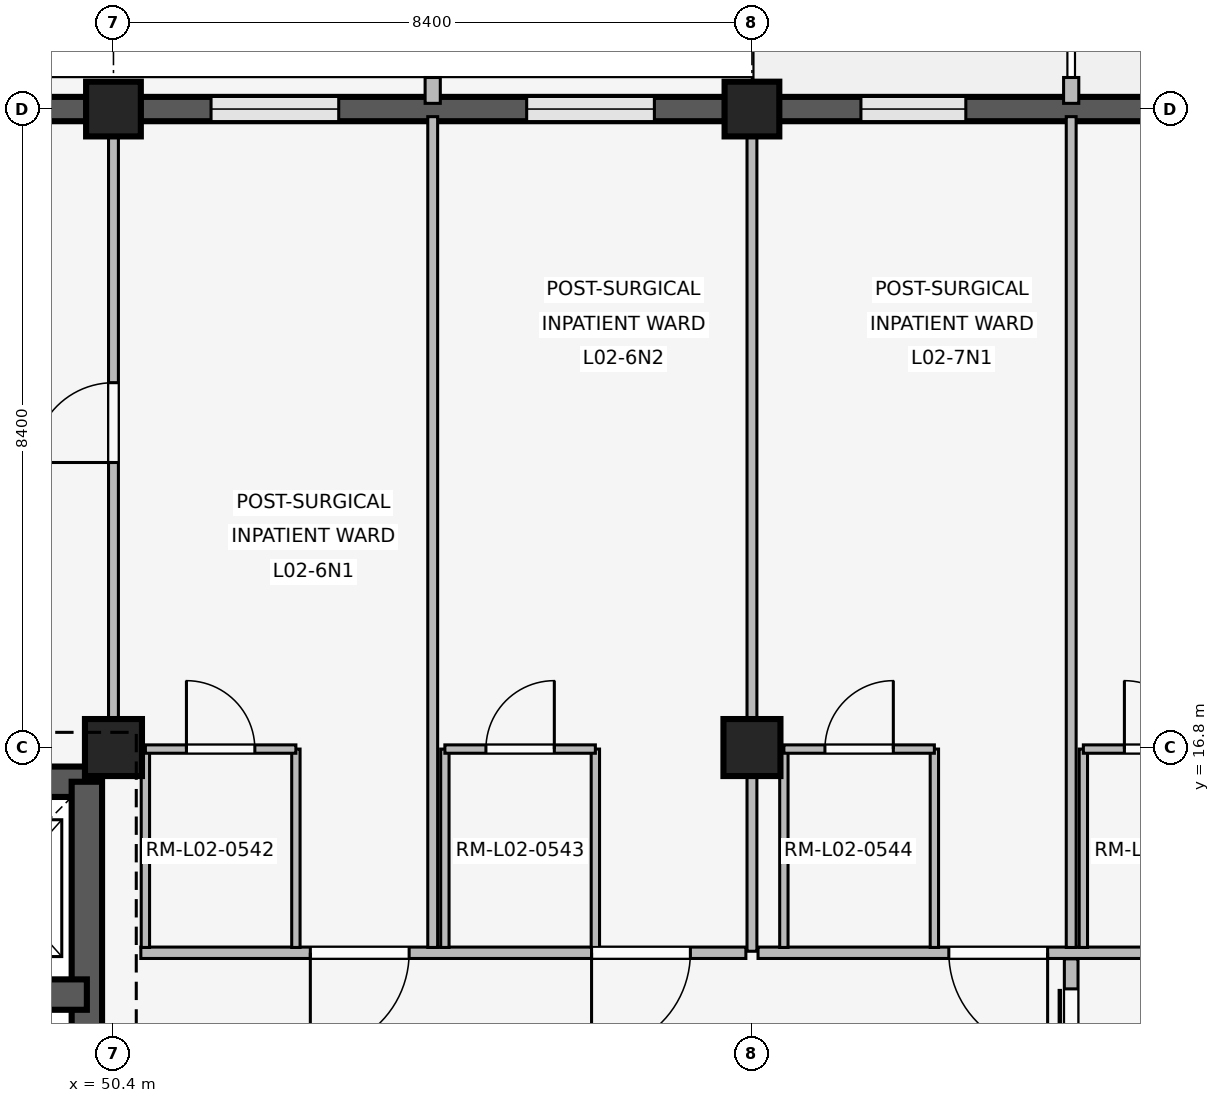
"""IFC4 building model, lengths in metres.
Left out: names, types, materials, properties, quantities, classifications, styles, units other than length and angle.
Written with IfcOpenShell. Run it as: python <this file> out.ifc"""

import sys

from ifc_helpers import new_model, si_unit, direction, frame, frame_2d, origin, origin_2d, place, context, subcontext, project, spatial, rectangle, extrude, element, fill, save


model = new_model("IFC4")
c1 = context("Model", 3, precision=1e-05, world=origin(), true_north=direction((0.0, 1.0)))
c2 = subcontext(c1, "Body", "Model", "MODEL_VIEW")
j1 = project(units=[si_unit("LENGTHUNIT", "METRE"), si_unit("PLANEANGLEUNIT", "RADIAN")], contexts=[c1])
p1 = place(None, origin())
s1 = spatial("IfcSite", under=j1, at=p1, CompositionType="ELEMENT")
p2 = place(p1, origin())
s2 = spatial("IfcBuilding", under=s1, at=p2, CompositionType="ELEMENT")
p3 = place(p2, frame((0.0, 0.0, 8.1)))
s3 = spatial("IfcBuildingStorey", under=s2, at=p3, CompositionType="ELEMENT", Elevation=8.1)
p4 = place(p3, frame((50.4, 16.8, 0.0), z_axis=(0.0, 0.0, 1.0), x_axis=(1.0, 0.0, 0.0)))
e1 = element("IfcColumn", 1, at=p4, inside=s3, PredefinedType="COLUMN", context=c2, shape_type="SweptSolid", body=[
    extrude(rectangle(XDim=0.75, YDim=0.75, at=origin_2d()), origin(), (0.0, 0.0, 1.0), 4.8),
])
p5 = place(p3, frame((50.4, 25.2, 0.0), z_axis=(0.0, 0.0, 1.0), x_axis=(1.0, 0.0, 0.0)))
e2 = element("IfcColumn", 2, at=p5, inside=s3, PredefinedType="COLUMN", context=c2, shape_type="SweptSolid", body=[
    extrude(rectangle(XDim=0.72, YDim=0.72, at=origin_2d()), origin(), (0.0, 0.0, 1.0), 4.8),
])
p6 = place(p3, frame((58.8, 16.8, 0.0), z_axis=(0.0, 0.0, 1.0), x_axis=(1.0, 0.0, 0.0)))
e3 = element("IfcColumn", 3, at=p6, inside=s3, PredefinedType="COLUMN", context=c2, shape_type="SweptSolid", body=[
    extrude(rectangle(XDim=0.75, YDim=0.75, at=origin_2d()), origin(), (0.0, 0.0, 1.0), 4.8),
])
p7 = place(p3, frame((58.8, 25.2, 0.0), z_axis=(0.0, 0.0, 1.0), x_axis=(1.0, 0.0, 0.0)))
e4 = element("IfcColumn", 4, at=p7, inside=s3, PredefinedType="COLUMN", context=c2, shape_type="SweptSolid", body=[
    extrude(rectangle(XDim=0.72, YDim=0.72, at=origin_2d()), origin(), (0.0, 0.0, 1.0), 4.8),
])
p8 = place(p3, frame((42.355, 25.2, 0.0), z_axis=(0.0, 0.0, 1.0), x_axis=(1.0, 0.0, 0.0)))
e5 = element("IfcWall", 5, at=p8, inside=s3, PredefinedType="SOLIDWALL", context=c2, shape_type="SweptSolid", body=[
    extrude(rectangle(XDim=7.69, YDim=0.32, at=frame_2d((3.845, 0.0))), origin(), (0.0, 0.0, 1.0), 3.86),
])
p9 = place(p8, frame((0.999, 0.0, 0.85)))
e6 = element("IfcOpeningElement", 6, at=p9, cuts=e5, PredefinedType="OPENING", context=c2, shape_type="SweptSolid", body=[
    extrude(rectangle(XDim=1.54, YDim=1.85, at=frame_2d((0.77, 0.925))), frame((0.0, 0.17, 0.0), z_axis=(0.0, -1.0, 0.0), x_axis=(1.0, 0.0, 0.0)), (0.0, 0.0, 1.0), 0.34),
])
p10 = place(p8, frame((5.151, 0.0, 0.85)))
e7 = element("IfcOpeningElement", 7, at=p10, cuts=e5, PredefinedType="OPENING", context=c2, shape_type="SweptSolid", body=[
    extrude(rectangle(XDim=1.54, YDim=1.85, at=frame_2d((0.77, 0.925))), frame((0.0, 0.17, 0.0), z_axis=(0.0, -1.0, 0.0), x_axis=(1.0, 0.0, 0.0)), (0.0, 0.0, 1.0), 0.34),
])
p11 = place(p3, frame((50.755, 25.2, 0.0), z_axis=(0.0, 0.0, 1.0), x_axis=(1.0, 0.0, 0.0)))
e8 = element("IfcWall", 8, at=p11, inside=s3, PredefinedType="SOLIDWALL", context=c2, shape_type="SweptSolid", body=[
    extrude(rectangle(XDim=7.69, YDim=0.32, at=frame_2d((3.845, 0.0))), origin(), (0.0, 0.0, 1.0), 3.86),
])
p12 = place(p11, frame((0.929, 0.0, 0.85)))
e9 = element("IfcOpeningElement", 9, at=p12, cuts=e8, PredefinedType="OPENING", context=c2, shape_type="SweptSolid", body=[
    extrude(rectangle(XDim=1.68, YDim=2.05, at=frame_2d((0.84, 1.025))), frame((0.0, 0.17, 0.0), z_axis=(0.0, -1.0, 0.0), x_axis=(1.0, 0.0, 0.0)), (0.0, 0.0, 1.0), 0.34),
])
p13 = place(p11, frame((5.081, 0.0, 0.85)))
e10 = element("IfcOpeningElement", 10, at=p13, cuts=e8, PredefinedType="OPENING", context=c2, shape_type="SweptSolid", body=[
    extrude(rectangle(XDim=1.68, YDim=2.05, at=frame_2d((0.84, 1.025))), frame((0.0, 0.17, 0.0), z_axis=(0.0, -1.0, 0.0), x_axis=(1.0, 0.0, 0.0)), (0.0, 0.0, 1.0), 0.34),
])
p14 = place(p3, frame((54.6, 25.275, 0.0), z_axis=(0.0, 0.0, 1.0), x_axis=(0.0, 1.0, 0.0)))
e11 = element("IfcWall", 11, at=p14, inside=s3, PredefinedType="ELEMENTEDWALL", context=c2, shape_type="SweptSolid", body=[
    extrude(rectangle(XDim=0.34, YDim=0.2, at=frame_2d((0.17, 0.0))), origin(), (0.0, 0.0, 1.0), 3.84),
])
p15 = place(p3, frame((59.155, 25.2, 0.0), z_axis=(0.0, 0.0, 1.0), x_axis=(1.0, 0.0, 0.0)))
e12 = element("IfcWall", 12, at=p15, inside=s3, PredefinedType="SOLIDWALL", context=c2, shape_type="SweptSolid", body=[
    extrude(rectangle(XDim=7.69, YDim=0.32, at=frame_2d((3.845, 0.0))), origin(), (0.0, 0.0, 1.0), 3.86),
])
p16 = place(p15, frame((1.079, 0.0, 0.85)))
e13 = element("IfcOpeningElement", 13, at=p16, cuts=e12, PredefinedType="OPENING", context=c2, shape_type="SweptSolid", body=[
    extrude(rectangle(XDim=1.38, YDim=1.5, at=frame_2d((0.69, 0.75))), frame((0.0, 0.17, 0.0), z_axis=(0.0, -1.0, 0.0), x_axis=(1.0, 0.0, 0.0)), (0.0, 0.0, 1.0), 0.34),
])
p17 = place(p15, frame((5.231, 0.0, 0.85)))
e14 = element("IfcOpeningElement", 14, at=p17, cuts=e12, PredefinedType="OPENING", context=c2, shape_type="SweptSolid", body=[
    extrude(rectangle(XDim=1.38, YDim=1.5, at=frame_2d((0.69, 0.75))), frame((0.0, 0.17, 0.0), z_axis=(0.0, -1.0, 0.0), x_axis=(1.0, 0.0, 0.0)), (0.0, 0.0, 1.0), 0.34),
])
p18 = place(p3, frame((63.0, 25.275, 0.0), z_axis=(0.0, 0.0, 1.0), x_axis=(0.0, 1.0, 0.0)))
e15 = element("IfcWall", 15, at=p18, inside=s3, PredefinedType="ELEMENTEDWALL", context=c2, shape_type="SweptSolid", body=[
    extrude(rectangle(XDim=0.34, YDim=0.2, at=frame_2d((0.17, 0.0))), origin(), (0.0, 0.0, 1.0), 3.84),
])
p19 = place(p3, frame((42.55, 16.35, 0.0), z_axis=(0.0, 0.0, 1.0), x_axis=(1.0, 0.0, 0.0)))
e16 = element("IfcWall", 16, at=p19, inside=s3, PredefinedType="SHEAR", context=c2, shape_type="SweptSolid", body=[
    extrude(rectangle(XDim=7.5, YDim=0.4, at=frame_2d((3.75, 0.0))), origin(), (0.0, 0.0, 1.0), 4.52),
])
p20 = place(p3, frame((50.05, 8.8, 0.0), z_axis=(0.0, 0.0, 1.0), x_axis=(0.0, 1.0, 0.0)))
e17 = element("IfcWall", 17, at=p20, inside=s3, PredefinedType="SHEAR", context=c2, shape_type="SweptSolid", body=[
    extrude(rectangle(XDim=7.55, YDim=0.4, at=frame_2d((3.775, 0.0))), origin(), (0.0, 0.0, 1.0), 4.52),
])
p21 = place(p20, frame((2.4, 0.0, 0.0)))
e18 = element("IfcOpeningElement", 18, at=p21, cuts=e17, PredefinedType="OPENING", context=c2, shape_type="SweptSolid", body=[
    extrude(rectangle(XDim=1.2, YDim=2.2, at=frame_2d((0.6, 1.1))), frame((0.0, 0.21, 0.0), z_axis=(0.0, -1.0, 0.0), x_axis=(1.0, 0.0, 0.0)), (0.0, 0.0, 1.0), 0.42),
])
p22 = place(p3, frame((46.25, 13.55, 0.0), z_axis=(0.0, 0.0, 1.0), x_axis=(1.0, 0.0, 0.0)))
e19 = element("IfcWall", 19, at=p22, inside=s3, PredefinedType="SHEAR", context=c2, shape_type="SweptSolid", body=[
    extrude(rectangle(XDim=3.8, YDim=0.4, at=frame_2d((1.9, 0.0))), origin(), (0.0, 0.0, 1.0), 4.52),
])
p23 = place(p22, frame((0.32, 0.0, 0.0)))
e20 = element("IfcOpeningElement", 20, at=p23, cuts=e19, PredefinedType="OPENING", context=c2, shape_type="SweptSolid", body=[
    extrude(rectangle(XDim=1.4, YDim=2.25, at=frame_2d((0.7, 1.125))), frame((0.0, 0.21, 0.0), z_axis=(0.0, -1.0, 0.0), x_axis=(1.0, 0.0, 0.0)), (0.0, 0.0, 1.0), 0.42),
])
p24 = place(p22, frame((2.04, 0.0, 0.0)))
e21 = element("IfcOpeningElement", 21, at=p24, cuts=e19, PredefinedType="OPENING", context=c2, shape_type="SweptSolid", body=[
    extrude(rectangle(XDim=1.1, YDim=2.15, at=frame_2d((0.55, 1.075))), frame((0.0, 0.21, 0.0), z_axis=(0.0, -1.0, 0.0), x_axis=(1.0, 0.0, 0.0)), (0.0, 0.0, 1.0), 0.42),
])
p25 = place(p3, frame((50.4, 17.15, 0.0), z_axis=(0.0, 0.0, 1.0), x_axis=(0.0, 1.0, 0.0)))
e22 = element("IfcWall", 22, at=p25, inside=s3, PredefinedType="PARTITIONING", context=c2, shape_type="SweptSolid", body=[
    extrude(rectangle(XDim=7.91, YDim=0.13, at=frame_2d((3.955, 0.0))), origin(), (0.0, 0.0, 1.0), 3.84),
])
p26 = place(p25, frame((3.4, 0.0, 0.0)))
e23 = element("IfcOpeningElement", 23, at=p26, cuts=e22, PredefinedType="OPENING", context=c2, shape_type="SweptSolid", body=[
    extrude(rectangle(XDim=1.05, YDim=2.2, at=frame_2d((0.525, 1.1))), frame((0.0, 0.075, 0.0), z_axis=(0.0, -1.0, 0.0), x_axis=(1.0, 0.0, 0.0)), (0.0, 0.0, 1.0), 0.15),
])
p27 = place(p3, frame((58.72, 14.1, 0.0), z_axis=(0.0, 0.0, 1.0), x_axis=(-1.0, 0.0, 0.0)))
e24 = element("IfcWall", 24, at=p27, inside=s3, PredefinedType="PARTITIONING", context=c2, shape_type="SweptSolid", body=[
    extrude(rectangle(XDim=7.96, YDim=0.15, at=frame_2d((3.98, 0.0))), origin(), (0.0, 0.0, 1.0), 3.84),
])
p28 = place(p27, frame((0.73, 0.0, 0.0)))
e25 = element("IfcOpeningElement", 25, at=p28, cuts=e24, PredefinedType="OPENING", context=c2, shape_type="SweptSolid", body=[
    extrude(rectangle(XDim=1.3, YDim=2.25, at=frame_2d((0.65, 1.125))), frame((0.0, 0.085, 0.0), z_axis=(0.0, -1.0, 0.0), x_axis=(1.0, 0.0, 0.0)), (0.0, 0.0, 1.0), 0.17),
])
p29 = place(p27, frame((4.43, 0.0, 0.0)))
e26 = element("IfcOpeningElement", 26, at=p29, cuts=e24, PredefinedType="OPENING", context=c2, shape_type="SweptSolid", body=[
    extrude(rectangle(XDim=1.3, YDim=2.25, at=frame_2d((0.65, 1.125))), frame((0.0, 0.085, 0.0), z_axis=(0.0, -1.0, 0.0), x_axis=(1.0, 0.0, 0.0)), (0.0, 0.0, 1.0), 0.17),
])
p30 = place(p3, frame((54.6, 14.17, 0.0), z_axis=(0.0, 0.0, 1.0), x_axis=(0.0, 1.0, 0.0)))
e27 = element("IfcWall", 27, at=p30, inside=s3, PredefinedType="PARTITIONING", context=c2, shape_type="SweptSolid", body=[
    extrude(rectangle(XDim=10.93, YDim=0.13, at=frame_2d((5.465, 0.0))), origin(), (0.0, 0.0, 1.0), 3.84),
])
for number, where, z_axis, x_axis in (
    (28, (50.82, 14.17, 0.0), (0.0, 0.0, 1.0), (0.0, 1.0, 0.0)),
    (29, (52.8, 14.17, 0.0), (0.0, 0.0, 1.0), (0.0, 1.0, 0.0)),
):
    element("IfcWall", number, at=place(p3, frame(where, z_axis=z_axis, x_axis=x_axis)), inside=s3, PredefinedType="PARTITIONING", context=c2, shape_type="SweptSolid", body=[
        extrude(rectangle(XDim=2.61, YDim=0.11, at=frame_2d((1.305, 0.0))), origin(), (0.0, 0.0, 1.0), 3.84),
    ])
p31 = place(p3, frame((50.82, 16.78, 0.0), z_axis=(0.0, 0.0, 1.0), x_axis=(1.0, 0.0, 0.0)))
e30 = element("IfcWall", 30, at=p31, inside=s3, PredefinedType="PARTITIONING", context=c2, shape_type="SweptSolid", body=[
    extrude(rectangle(XDim=1.98, YDim=0.11, at=frame_2d((0.99, 0.0))), origin(), (0.0, 0.0, 1.0), 3.84),
])
p32 = place(p31, frame((0.54, 0.0, 0.0)))
e31 = element("IfcOpeningElement", 31, at=p32, cuts=e30, PredefinedType="OPENING", context=c2, shape_type="SweptSolid", body=[
    extrude(rectangle(XDim=0.9, YDim=2.1, at=frame_2d((0.45, 1.05))), frame((0.0, 0.065, 0.0), z_axis=(0.0, -1.0, 0.0), x_axis=(1.0, 0.0, 0.0)), (0.0, 0.0, 1.0), 0.13),
])
for number, where, z_axis, x_axis in (
    (32, (54.76, 14.17, 0.0), (0.0, 0.0, 1.0), (0.0, 1.0, 0.0)),
    (33, (56.74, 14.17, 0.0), (0.0, 0.0, 1.0), (0.0, 1.0, 0.0)),
):
    element("IfcWall", number, at=place(p3, frame(where, z_axis=z_axis, x_axis=x_axis)), inside=s3, PredefinedType="PARTITIONING", context=c2, shape_type="SweptSolid", body=[
        extrude(rectangle(XDim=2.61, YDim=0.11, at=frame_2d((1.305, 0.0))), origin(), (0.0, 0.0, 1.0), 3.84),
    ])
p33 = place(p3, frame((54.76, 16.78, 0.0), z_axis=(0.0, 0.0, 1.0), x_axis=(1.0, 0.0, 0.0)))
e34 = element("IfcWall", 34, at=p33, inside=s3, PredefinedType="PARTITIONING", context=c2, shape_type="SweptSolid", body=[
    extrude(rectangle(XDim=1.98, YDim=0.11, at=frame_2d((0.99, 0.0))), origin(), (0.0, 0.0, 1.0), 3.84),
])
p34 = place(p33, frame((0.54, 0.0, 0.0)))
e35 = element("IfcOpeningElement", 35, at=p34, cuts=e34, PredefinedType="OPENING", context=c2, shape_type="SweptSolid", body=[
    extrude(rectangle(XDim=0.9, YDim=2.1, at=frame_2d((0.45, 1.05))), frame((0.0, 0.065, 0.0), z_axis=(0.0, -1.0, 0.0), x_axis=(1.0, 0.0, 0.0)), (0.0, 0.0, 1.0), 0.13),
])
p35 = place(p3, frame((58.8, 14.12, 0.0), z_axis=(0.0, 0.0, 1.0), x_axis=(0.0, 1.0, 0.0)))
e36 = element("IfcWall", 36, at=p35, inside=s3, PredefinedType="PARTITIONING", context=c2, shape_type="SweptSolid", body=[
    extrude(rectangle(XDim=10.94, YDim=0.13, at=frame_2d((5.47, 0.0))), origin(), (0.0, 0.0, 1.0), 3.84),
])
p36 = place(p3, frame((67.12, 14.1, 0.0), z_axis=(0.0, 0.0, 1.0), x_axis=(-1.0, 0.0, 0.0)))
e37 = element("IfcWall", 37, at=p36, inside=s3, PredefinedType="PARTITIONING", context=c2, shape_type="SweptSolid", body=[
    extrude(rectangle(XDim=8.24, YDim=0.15, at=frame_2d((4.12, 0.0))), origin(), (0.0, 0.0, 1.0), 3.84),
])
p37 = place(p36, frame((0.73, 0.0, 0.0)))
e38 = element("IfcOpeningElement", 38, at=p37, cuts=e37, PredefinedType="OPENING", context=c2, shape_type="SweptSolid", body=[
    extrude(rectangle(XDim=1.3, YDim=2.25, at=frame_2d((0.65, 1.125))), frame((0.0, 0.085, 0.0), z_axis=(0.0, -1.0, 0.0), x_axis=(1.0, 0.0, 0.0)), (0.0, 0.0, 1.0), 0.17),
])
p38 = place(p36, frame((4.43, 0.0, 0.0)))
e39 = element("IfcOpeningElement", 39, at=p38, cuts=e37, PredefinedType="OPENING", context=c2, shape_type="SweptSolid", body=[
    extrude(rectangle(XDim=1.3, YDim=2.25, at=frame_2d((0.65, 1.125))), frame((0.0, 0.085, 0.0), z_axis=(0.0, -1.0, 0.0), x_axis=(1.0, 0.0, 0.0)), (0.0, 0.0, 1.0), 0.17),
])
p39 = place(p3, frame((63.0, 14.17, 0.0), z_axis=(0.0, 0.0, 1.0), x_axis=(0.0, 1.0, 0.0)))
e40 = element("IfcWall", 40, at=p39, inside=s3, PredefinedType="PARTITIONING", context=c2, shape_type="SweptSolid", body=[
    extrude(rectangle(XDim=10.93, YDim=0.13, at=frame_2d((5.465, 0.0))), origin(), (0.0, 0.0, 1.0), 3.84),
])
for number, where, z_axis, x_axis in (
    (41, (59.22, 14.17, 0.0), (0.0, 0.0, 1.0), (0.0, 1.0, 0.0)),
    (42, (61.2, 14.17, 0.0), (0.0, 0.0, 1.0), (0.0, 1.0, 0.0)),
):
    element("IfcWall", number, at=place(p3, frame(where, z_axis=z_axis, x_axis=x_axis)), inside=s3, PredefinedType="PARTITIONING", context=c2, shape_type="SweptSolid", body=[
        extrude(rectangle(XDim=2.61, YDim=0.11, at=frame_2d((1.305, 0.0))), origin(), (0.0, 0.0, 1.0), 3.84),
    ])
p40 = place(p3, frame((59.22, 16.78, 0.0), z_axis=(0.0, 0.0, 1.0), x_axis=(1.0, 0.0, 0.0)))
e43 = element("IfcWall", 43, at=p40, inside=s3, PredefinedType="PARTITIONING", context=c2, shape_type="SweptSolid", body=[
    extrude(rectangle(XDim=1.98, YDim=0.11, at=frame_2d((0.99, 0.0))), origin(), (0.0, 0.0, 1.0), 3.84),
])
p41 = place(p40, frame((0.54, 0.0, 0.0)))
e44 = element("IfcOpeningElement", 44, at=p41, cuts=e43, PredefinedType="OPENING", context=c2, shape_type="SweptSolid", body=[
    extrude(rectangle(XDim=0.9, YDim=2.1, at=frame_2d((0.45, 1.05))), frame((0.0, 0.065, 0.0), z_axis=(0.0, -1.0, 0.0), x_axis=(1.0, 0.0, 0.0)), (0.0, 0.0, 1.0), 0.13),
])
p42 = place(p3, frame((63.16, 14.17, 0.0), z_axis=(0.0, 0.0, 1.0), x_axis=(0.0, 1.0, 0.0)))
e45 = element("IfcWall", 45, at=p42, inside=s3, PredefinedType="PARTITIONING", context=c2, shape_type="SweptSolid", body=[
    extrude(rectangle(XDim=2.61, YDim=0.11, at=frame_2d((1.305, 0.0))), origin(), (0.0, 0.0, 1.0), 3.84),
])
p43 = place(p3, frame((63.16, 16.78, 0.0), z_axis=(0.0, 0.0, 1.0), x_axis=(1.0, 0.0, 0.0)))
e46 = element("IfcWall", 46, at=p43, inside=s3, PredefinedType="PARTITIONING", context=c2, shape_type="SweptSolid", body=[
    extrude(rectangle(XDim=1.98, YDim=0.11, at=frame_2d((0.99, 0.0))), origin(), (0.0, 0.0, 1.0), 3.84),
])
p44 = place(p43, frame((0.54, 0.0, 0.0)))
e47 = element("IfcOpeningElement", 47, at=p44, cuts=e46, PredefinedType="OPENING", context=c2, shape_type="SweptSolid", body=[
    extrude(rectangle(XDim=0.9, YDim=2.1, at=frame_2d((0.45, 1.05))), frame((0.0, 0.065, 0.0), z_axis=(0.0, -1.0, 0.0), x_axis=(1.0, 0.0, 0.0)), (0.0, 0.0, 1.0), 0.13),
])
p45 = place(p3, frame((63.0, 11.18, 0.0), z_axis=(0.0, 0.0, 1.0), x_axis=(0.0, 1.0, 0.0)))
e48 = element("IfcWall", 48, at=p45, inside=s3, PredefinedType="PARTITIONING", context=c2, shape_type="SweptSolid", body=[
    extrude(rectangle(XDim=2.84, YDim=0.18, at=frame_2d((1.42, 0.0))), origin(), (0.0, 0.0, 1.0), 3.84),
])
p46 = place(p45, frame((0.395, 0.0, 0.0)))
e49 = element("IfcOpeningElement", 49, at=p46, cuts=e48, PredefinedType="OPENING", context=c2, shape_type="SweptSolid", body=[
    extrude(rectangle(XDim=2.05, YDim=2.35, at=frame_2d((1.025, 1.175))), frame((0.0, 0.1, 0.0), z_axis=(0.0, -1.0, 0.0), x_axis=(1.0, 0.0, 0.0)), (0.0, 0.0, 1.0), 0.2),
])
p47 = place(p12, origin())
e50 = element("IfcWindow", 50, at=p47, inside=s3, PartitioningType="SINGLE_PANEL", PredefinedType="WINDOW", context=c2, shape_type="SweptSolid", body=[
    extrude(rectangle(XDim=1.68, YDim=2.05, at=frame_2d((0.84, 1.025))), frame((0.0, 0.03, 0.0), z_axis=(0.0, -1.0, 0.0), x_axis=(1.0, 0.0, 0.0)), (0.0, 0.0, 1.0), 0.06),
])
fill(e9, e50)
p48 = place(p13, origin())
e51 = element("IfcWindow", 51, at=p48, inside=s3, PartitioningType="SINGLE_PANEL", PredefinedType="WINDOW", context=c2, shape_type="SweptSolid", body=[
    extrude(rectangle(XDim=1.68, YDim=2.05, at=frame_2d((0.84, 1.025))), frame((0.0, 0.03, 0.0), z_axis=(0.0, -1.0, 0.0), x_axis=(1.0, 0.0, 0.0)), (0.0, 0.0, 1.0), 0.06),
])
fill(e10, e51)
p49 = place(p16, origin())
e52 = element("IfcWindow", 52, at=p49, inside=s3, PartitioningType="SINGLE_PANEL", PredefinedType="WINDOW", context=c2, shape_type="SweptSolid", body=[
    extrude(rectangle(XDim=1.38, YDim=1.5, at=frame_2d((0.69, 0.75))), frame((0.0, 0.03, 0.0), z_axis=(0.0, -1.0, 0.0), x_axis=(1.0, 0.0, 0.0)), (0.0, 0.0, 1.0), 0.06),
])
fill(e13, e52)
p50 = place(p26, origin())
e53 = element("IfcDoor", 53, at=p50, inside=s3, OperationType="SINGLE_SWING_LEFT", PredefinedType="DOOR", context=c2, shape_type="SweptSolid", body=[
    extrude(rectangle(XDim=1.05, YDim=2.2, at=frame_2d((0.525, 1.1))), frame((0.0, 0.025, 0.0), z_axis=(0.0, -1.0, 0.0), x_axis=(1.0, 0.0, 0.0)), (0.0, 0.0, 1.0), 0.05),
])
fill(e23, e53)
p51 = place(p28, origin())
e54 = element("IfcDoor", 54, at=p51, inside=s3, OperationType="SINGLE_SWING_RIGHT", PredefinedType="DOOR", context=c2, shape_type="SweptSolid", body=[
    extrude(rectangle(XDim=1.3, YDim=2.25, at=frame_2d((0.65, 1.125))), frame((0.0, 0.025, 0.0), z_axis=(0.0, -1.0, 0.0), x_axis=(1.0, 0.0, 0.0)), (0.0, 0.0, 1.0), 0.05),
])
fill(e25, e54)
p52 = place(p29, origin())
e55 = element("IfcDoor", 55, at=p52, inside=s3, OperationType="SINGLE_SWING_RIGHT", PredefinedType="DOOR", context=c2, shape_type="SweptSolid", body=[
    extrude(rectangle(XDim=1.3, YDim=2.25, at=frame_2d((0.65, 1.125))), frame((0.0, 0.025, 0.0), z_axis=(0.0, -1.0, 0.0), x_axis=(1.0, 0.0, 0.0)), (0.0, 0.0, 1.0), 0.05),
])
fill(e26, e55)
p53 = place(p32, origin())
e56 = element("IfcDoor", 56, at=p53, inside=s3, OperationType="SINGLE_SWING_LEFT", PredefinedType="DOOR", context=c2, shape_type="SweptSolid", body=[
    extrude(rectangle(XDim=0.9, YDim=2.1, at=frame_2d((0.45, 1.05))), frame((0.0, 0.025, 0.0), z_axis=(0.0, -1.0, 0.0), x_axis=(1.0, 0.0, 0.0)), (0.0, 0.0, 1.0), 0.05),
])
fill(e31, e56)
p54 = place(p34, origin())
e57 = element("IfcDoor", 57, at=p54, inside=s3, OperationType="SINGLE_SWING_RIGHT", PredefinedType="DOOR", context=c2, shape_type="SweptSolid", body=[
    extrude(rectangle(XDim=0.9, YDim=2.1, at=frame_2d((0.45, 1.05))), frame((0.0, 0.025, 0.0), z_axis=(0.0, -1.0, 0.0), x_axis=(1.0, 0.0, 0.0)), (0.0, 0.0, 1.0), 0.05),
])
fill(e35, e57)
p55 = place(p38, origin())
e58 = element("IfcDoor", 58, at=p55, inside=s3, OperationType="SINGLE_SWING_LEFT", PredefinedType="DOOR", context=c2, shape_type="SweptSolid", body=[
    extrude(rectangle(XDim=1.3, YDim=2.25, at=frame_2d((0.65, 1.125))), frame((0.0, 0.025, 0.0), z_axis=(0.0, -1.0, 0.0), x_axis=(1.0, 0.0, 0.0)), (0.0, 0.0, 1.0), 0.05),
])
fill(e39, e58)
p56 = place(p41, origin())
e59 = element("IfcDoor", 59, at=p56, inside=s3, OperationType="SINGLE_SWING_RIGHT", PredefinedType="DOOR", context=c2, shape_type="SweptSolid", body=[
    extrude(rectangle(XDim=0.9, YDim=2.1, at=frame_2d((0.45, 1.05))), frame((0.0, 0.025, 0.0), z_axis=(0.0, -1.0, 0.0), x_axis=(1.0, 0.0, 0.0)), (0.0, 0.0, 1.0), 0.05),
])
fill(e44, e59)
p57 = place(p44, origin())
e60 = element("IfcDoor", 60, at=p57, inside=s3, OperationType="SINGLE_SWING_LEFT", PredefinedType="DOOR", context=c2, shape_type="SweptSolid", body=[
    extrude(rectangle(XDim=0.9, YDim=2.1, at=frame_2d((0.45, 1.05))), frame((0.0, 0.025, 0.0), z_axis=(0.0, -1.0, 0.0), x_axis=(1.0, 0.0, 0.0)), (0.0, 0.0, 1.0), 0.05),
])
fill(e47, e60)
p58 = place(p46, origin())
e61 = element("IfcDoor", 61, at=p58, inside=s3, OperationType="SLIDING_TO_LEFT", PredefinedType="DOOR", context=c2, shape_type="SweptSolid", body=[
    extrude(rectangle(XDim=2.05, YDim=2.35, at=frame_2d((1.025, 1.175))), frame((0.0, 0.025, 0.0), z_axis=(0.0, -1.0, 0.0), x_axis=(1.0, 0.0, 0.0)), (0.0, 0.0, 1.0), 0.05),
])
fill(e49, e61)
save(model, sys.argv[1])
